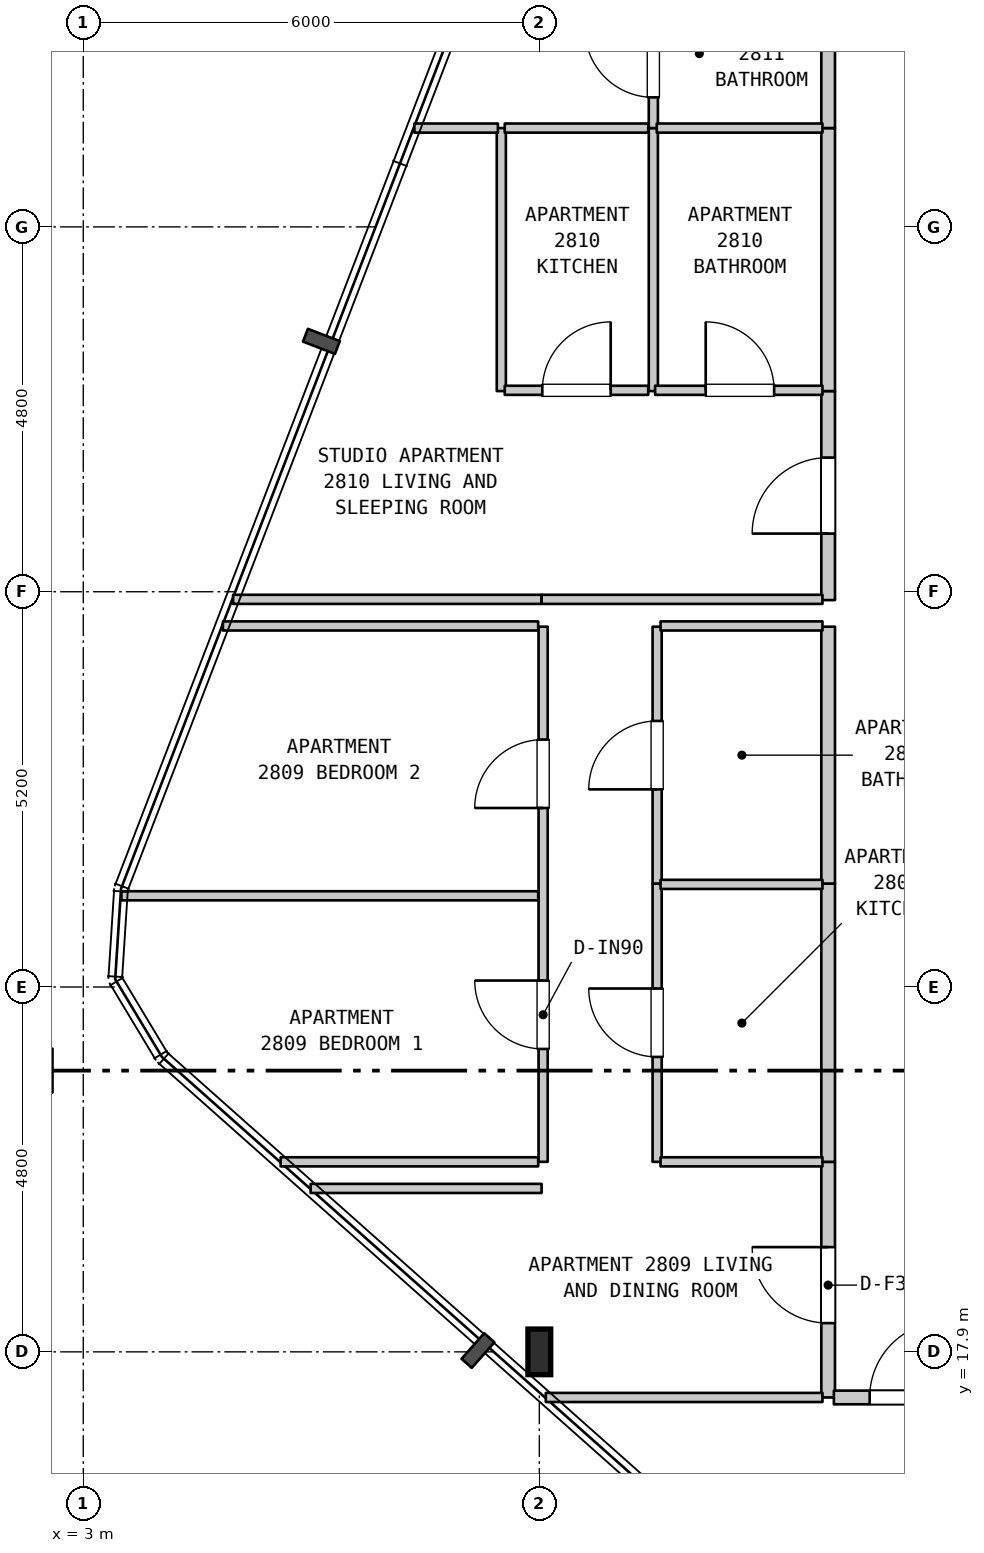
"""IFC4 building model, lengths in metres.
Left out: names, types, materials, properties, quantities, classifications, styles, units other than length and angle.
Written with IfcOpenShell. Run it as: python <this file> out.ifc"""

import sys

from ifc_helpers import new_model, si_unit, direction, frame, frame_2d, origin, origin_2d, place, context, subcontext, project, spatial, rectangle, i_section, extrude, element, fill, save


model = new_model("IFC4")
c1 = context("Model", 3, precision=1e-05, world=origin(), true_north=direction((0.0, 1.0)))
c2 = subcontext(c1, "Body", "Model", "MODEL_VIEW")
j1 = project(units=[si_unit("LENGTHUNIT", "METRE"), si_unit("PLANEANGLEUNIT", "RADIAN")], contexts=[c1])
p1 = place(None, origin())
s1 = spatial("IfcSite", under=j1, at=p1, CompositionType="ELEMENT")
p2 = place(p1, origin())
s2 = spatial("IfcBuilding", under=s1, at=p2, CompositionType="ELEMENT")
p3 = place(p2, frame((0.0, 0.0, 116.8)))
s3 = spatial("IfcBuildingStorey", under=s2, at=p3, CompositionType="ELEMENT", Elevation=116.8)
p4 = place(p3, frame((9.0, 17.9, 0.0), z_axis=(0.0, 0.0, 1.0), x_axis=(1.0, 0.0, 0.0)))
e1 = element("IfcColumn", 1, at=p4, inside=s3, PredefinedType="COLUMN", context=c2, shape_type="SweptSolid", body=[
    extrude(i_section(OverallWidth=0.3, OverallDepth=0.6, WebThickness=0.015, FlangeThickness=0.03, FilletRadius=0.027, at=origin_2d()), origin(), (0.0, 0.0, 1.0), 3.7),
])
p5 = place(p3, frame((8.5, 30.54, 0.0), z_axis=(0.0, 0.0, 1.0), x_axis=(0.0, 1.0, 0.0)))
e2 = element("IfcWall", 2, at=p5, inside=s3, PredefinedType="PARTITIONING", context=c2, shape_type="SweptSolid", body=[
    extrude(rectangle(XDim=3.46, YDim=0.12, at=frame_2d((1.73, 0.0))), origin(), (0.0, 0.0, 1.0), 3.38),
])
p6 = place(p3, frame((9.05, 20.4, 0.0), z_axis=(0.0, 0.0, 1.0), x_axis=(0.0, 1.0, 0.0)))
e3 = element("IfcWall", 3, at=p6, inside=s3, PredefinedType="PARTITIONING", context=c2, shape_type="SweptSolid", body=[
    extrude(rectangle(XDim=7.04, YDim=0.12, at=frame_2d((3.52, 0.0))), origin(), (0.0, 0.0, 1.0), 2.78),
])
p7 = place(p6, frame((1.485, 0.0, 0.0)))
e4 = element("IfcOpeningElement", 4, at=p7, cuts=e3, PredefinedType="OPENING", context=c2, shape_type="SweptSolid", body=[
    extrude(rectangle(XDim=0.9, YDim=2.15, at=frame_2d((0.45, 1.075))), frame((0.0, 0.07, 0.0), z_axis=(0.0, -1.0, 0.0), x_axis=(1.0, 0.0, 0.0)), (0.0, 0.0, 1.0), 0.14),
])
p8 = place(p6, frame((4.655, 0.0, 0.0)))
e5 = element("IfcOpeningElement", 5, at=p8, cuts=e3, PredefinedType="OPENING", context=c2, shape_type="SweptSolid", body=[
    extrude(rectangle(XDim=0.9, YDim=2.15, at=frame_2d((0.45, 1.075))), frame((0.0, 0.07, 0.0), z_axis=(0.0, -1.0, 0.0), x_axis=(1.0, 0.0, 0.0)), (0.0, 0.0, 1.0), 0.14),
])
p9 = place(p3, frame((10.5, 30.54, 0.0), z_axis=(0.0, 0.0, 1.0), x_axis=(0.0, 1.0, 0.0)))
e6 = element("IfcWall", 6, at=p9, inside=s3, PredefinedType="PARTITIONING", context=c2, shape_type="SweptSolid", body=[
    extrude(rectangle(XDim=3.46, YDim=0.12, at=frame_2d((1.73, 0.0))), origin(), (0.0, 0.0, 1.0), 3.38),
])
p10 = place(p3, frame((10.5, 34.0, 0.0), z_axis=(0.0, 0.0, 1.0), x_axis=(0.0, 1.0, 0.0)))
e7 = element("IfcWall", 7, at=p10, inside=s3, PredefinedType="PARTITIONING", context=c2, shape_type="SweptSolid", body=[
    extrude(rectangle(XDim=1.708, YDim=0.12, at=frame_2d((0.854, 0.0))), origin(), (0.0, 0.0, 1.0), 3.38),
])
p11 = place(p10, frame((0.404, 0.0, 0.0)))
e8 = element("IfcOpeningElement", 8, at=p11, cuts=e7, PredefinedType="OPENING", context=c2, shape_type="SweptSolid", body=[
    extrude(rectangle(XDim=0.9, YDim=2.15, at=frame_2d((0.45, 1.075))), frame((0.0, 0.07, 0.0), z_axis=(0.0, -1.0, 0.0), x_axis=(1.0, 0.0, 0.0)), (0.0, 0.0, 1.0), 0.14),
])
p12 = place(p3, frame((10.55, 20.4, 0.0), z_axis=(0.0, 0.0, 1.0), x_axis=(0.0, 1.0, 0.0)))
e9 = element("IfcWall", 9, at=p12, inside=s3, PredefinedType="PARTITIONING", context=c2, shape_type="SweptSolid", body=[
    extrude(rectangle(XDim=3.661, YDim=0.12, at=frame_2d((1.831, 0.0))), origin(), (0.0, 0.0, 1.0), 3.38),
])
p13 = place(p12, frame((1.38, 0.0, 0.0)))
e10 = element("IfcOpeningElement", 10, at=p13, cuts=e9, PredefinedType="OPENING", context=c2, shape_type="SweptSolid", body=[
    extrude(rectangle(XDim=0.9, YDim=2.15, at=frame_2d((0.45, 1.075))), frame((0.0, 0.07, 0.0), z_axis=(0.0, -1.0, 0.0), x_axis=(1.0, 0.0, 0.0)), (0.0, 0.0, 1.0), 0.14),
])
p14 = place(p3, frame((10.55, 24.061, 0.0), z_axis=(0.0, 0.0, 1.0), x_axis=(0.0, 1.0, 0.0)))
e11 = element("IfcWall", 11, at=p14, inside=s3, PredefinedType="PARTITIONING", context=c2, shape_type="SweptSolid", body=[
    extrude(rectangle(XDim=3.379, YDim=0.12, at=frame_2d((1.689, 0.0))), origin(), (0.0, 0.0, 1.0), 3.38),
])
p15 = place(p14, frame((1.239, 0.0, 0.0)))
e12 = element("IfcOpeningElement", 12, at=p15, cuts=e11, PredefinedType="OPENING", context=c2, shape_type="SweptSolid", body=[
    extrude(rectangle(XDim=0.9, YDim=2.1, at=frame_2d((0.45, 1.05))), frame((0.0, 0.07, 0.0), z_axis=(0.0, -1.0, 0.0), x_axis=(1.0, 0.0, 0.0)), (0.0, 0.0, 1.0), 0.14),
])
p16 = place(p3, frame((12.8, 17.3, 0.0), z_axis=(0.0, 0.0, 1.0), x_axis=(0.0, 1.0, 0.0)))
e13 = element("IfcWall", 13, at=p16, inside=s3, PredefinedType="STANDARD", context=c2, shape_type="SweptSolid", body=[
    extrude(rectangle(XDim=3.1, YDim=0.18, at=frame_2d((1.55, 0.0))), origin(), (0.0, 0.0, 1.0), 3.38),
])
p17 = place(p16, frame((0.978, 0.0, 0.0)))
e14 = element("IfcOpeningElement", 14, at=p17, cuts=e13, PredefinedType="OPENING", context=c2, shape_type="SweptSolid", body=[
    extrude(rectangle(XDim=1.0, YDim=2.15, at=frame_2d((0.5, 1.075))), frame((0.0, 0.1, 0.0), z_axis=(0.0, -1.0, 0.0), x_axis=(1.0, 0.0, 0.0)), (0.0, 0.0, 1.0), 0.2),
])
p18 = place(p3, frame((12.8, 20.4, 0.0), z_axis=(0.0, 0.0, 1.0), x_axis=(0.0, 1.0, 0.0)))
e15 = element("IfcWall", 15, at=p18, inside=s3, PredefinedType="STANDARD", context=c2, shape_type="SweptSolid", body=[
    extrude(rectangle(XDim=3.661, YDim=0.18, at=frame_2d((1.831, 0.0))), origin(), (0.0, 0.0, 1.0), 3.38),
])
p19 = place(p3, frame((12.8, 24.061, 0.0), z_axis=(0.0, 0.0, 1.0), x_axis=(0.0, 1.0, 0.0)))
e16 = element("IfcWall", 16, at=p19, inside=s3, PredefinedType="STANDARD", context=c2, shape_type="SweptSolid", body=[
    extrude(rectangle(XDim=3.379, YDim=0.18, at=frame_2d((1.689, 0.0))), origin(), (0.0, 0.0, 1.0), 3.38),
])
p20 = place(p3, frame((12.8, 27.79, 0.0), z_axis=(0.0, 0.0, 1.0), x_axis=(0.0, 1.0, 0.0)))
e17 = element("IfcWall", 17, at=p20, inside=s3, PredefinedType="STANDARD", context=c2, shape_type="SweptSolid", body=[
    extrude(rectangle(XDim=2.75, YDim=0.18, at=frame_2d((1.375, 0.0))), origin(), (0.0, 0.0, 1.0), 3.38),
])
p21 = place(p20, frame((0.875, 0.0, 0.0)))
e18 = element("IfcOpeningElement", 18, at=p21, cuts=e17, PredefinedType="OPENING", context=c2, shape_type="SweptSolid", body=[
    extrude(rectangle(XDim=1.0, YDim=2.15, at=frame_2d((0.5, 1.075))), frame((0.0, 0.1, 0.0), z_axis=(0.0, -1.0, 0.0), x_axis=(1.0, 0.0, 0.0)), (0.0, 0.0, 1.0), 0.2),
])
p22 = place(p3, frame((12.8, 30.54, 0.0), z_axis=(0.0, 0.0, 1.0), x_axis=(0.0, 1.0, 0.0)))
e19 = element("IfcWall", 19, at=p22, inside=s3, PredefinedType="STANDARD", context=c2, shape_type="SweptSolid", body=[
    extrude(rectangle(XDim=3.46, YDim=0.18, at=frame_2d((1.73, 0.0))), origin(), (0.0, 0.0, 1.0), 3.38),
])
p23 = place(p3, frame((12.8, 34.0, 0.0), z_axis=(0.0, 0.0, 1.0), x_axis=(0.0, 1.0, 0.0)))
e20 = element("IfcWall", 20, at=p23, inside=s3, PredefinedType="STANDARD", context=c2, shape_type="SweptSolid", body=[
    extrude(rectangle(XDim=1.708, YDim=0.18, at=frame_2d((0.854, 0.0))), origin(), (0.0, 0.0, 1.0), 3.38),
])
p24 = place(p3, frame((9.085, 17.3, 0.0), z_axis=(0.0, 0.0, 1.0), x_axis=(1.0, 0.0, 0.0)))
e21 = element("IfcWall", 21, at=p24, inside=s3, PredefinedType="PARTITIONING", context=c2, shape_type="SweptSolid", body=[
    extrude(rectangle(XDim=3.64, YDim=0.12, at=frame_2d((1.82, 0.0))), origin(), (0.0, 0.0, 1.0), 3.38),
])
p25 = place(p3, frame((12.875, 17.3, 0.0), z_axis=(0.0, 0.0, 1.0), x_axis=(1.0, 0.0, 0.0)))
e22 = element("IfcWall", 22, at=p25, inside=s3, PredefinedType="STANDARD", context=c2, shape_type="SweptSolid", body=[
    extrude(rectangle(XDim=3.28, YDim=0.18, at=frame_2d((1.64, 0.0))), origin(), (0.0, 0.0, 1.0), 3.38),
])
p26 = place(p25, frame((0.471, 0.0, 0.0)))
e23 = element("IfcOpeningElement", 23, at=p26, cuts=e22, PredefinedType="OPENING", context=c2, shape_type="SweptSolid", body=[
    extrude(rectangle(XDim=1.0, YDim=2.15, at=frame_2d((0.5, 1.075))), frame((0.0, 0.1, 0.0), z_axis=(0.0, -1.0, 0.0), x_axis=(1.0, 0.0, 0.0)), (0.0, 0.0, 1.0), 0.2),
])
p27 = place(p3, frame((5.991, 20.05, 0.0), z_axis=(0.0, 0.0, 1.0), x_axis=(1.0, 0.0, 0.0)))
e24 = element("IfcWall", 24, at=p27, inside=s3, PredefinedType="PARTITIONING", context=c2, shape_type="SweptSolid", body=[
    extrude(rectangle(XDim=3.039, YDim=0.12, at=frame_2d((1.52, 0.0))), origin(), (0.0, 0.0, 1.0), 3.38),
])
p28 = place(p3, frame((5.597, 20.4, 0.0), z_axis=(0.0, 0.0, 1.0), x_axis=(1.0, 0.0, 0.0)))
e25 = element("IfcWall", 25, at=p28, inside=s3, PredefinedType="PARTITIONING", context=c2, shape_type="SweptSolid", body=[
    extrude(rectangle(XDim=3.388, YDim=0.12, at=frame_2d((1.694, 0.0))), origin(), (0.0, 0.0, 1.0), 3.38),
])
p29 = place(p3, frame((10.595, 20.4, 0.0), z_axis=(0.0, 0.0, 1.0), x_axis=(1.0, 0.0, 0.0)))
e26 = element("IfcWall", 26, at=p29, inside=s3, PredefinedType="PARTITIONING", context=c2, shape_type="SweptSolid", body=[
    extrude(rectangle(XDim=2.13, YDim=0.12, at=frame_2d((1.065, 0.0))), origin(), (0.0, 0.0, 1.0), 3.38),
])
p30 = place(p3, frame((3.501, 23.9, 0.0), z_axis=(0.0, 0.0, 1.0), x_axis=(1.0, 0.0, 0.0)))
e27 = element("IfcWall", 27, at=p30, inside=s3, PredefinedType="PARTITIONING", context=c2, shape_type="SweptSolid", body=[
    extrude(rectangle(XDim=5.484, YDim=0.12, at=frame_2d((2.742, 0.0))), origin(), (0.0, 0.0, 1.0), 3.38),
])
p31 = place(p3, frame((10.595, 24.05, 0.0), z_axis=(0.0, 0.0, 1.0), x_axis=(1.0, 0.0, 0.0)))
e28 = element("IfcWall", 28, at=p31, inside=s3, PredefinedType="PARTITIONING", context=c2, shape_type="SweptSolid", body=[
    extrude(rectangle(XDim=2.13, YDim=0.12, at=frame_2d((1.065, 0.0))), origin(), (0.0, 0.0, 1.0), 3.38),
])
p32 = place(p3, frame((4.837, 27.45, 0.0), z_axis=(0.0, 0.0, 1.0), x_axis=(1.0, 0.0, 0.0)))
e29 = element("IfcWall", 29, at=p32, inside=s3, PredefinedType="PARTITIONING", context=c2, shape_type="SweptSolid", body=[
    extrude(rectangle(XDim=4.148, YDim=0.12, at=frame_2d((2.074, 0.0))), origin(), (0.0, 0.0, 1.0), 3.38),
])
p33 = place(p3, frame((10.595, 27.45, 0.0), z_axis=(0.0, 0.0, 1.0), x_axis=(1.0, 0.0, 0.0)))
e30 = element("IfcWall", 30, at=p33, inside=s3, PredefinedType="PARTITIONING", context=c2, shape_type="SweptSolid", body=[
    extrude(rectangle(XDim=2.13, YDim=0.12, at=frame_2d((1.065, 0.0))), origin(), (0.0, 0.0, 1.0), 3.38),
])
p34 = place(p3, frame((4.971, 27.8, 0.0), z_axis=(0.0, 0.0, 1.0), x_axis=(1.0, 0.0, 0.0)))
e31 = element("IfcWall", 31, at=p34, inside=s3, PredefinedType="PARTITIONING", context=c2, shape_type="SweptSolid", body=[
    extrude(rectangle(XDim=4.059, YDim=0.12, at=frame_2d((2.03, 0.0))), origin(), (0.0, 0.0, 1.0), 3.38),
])
p35 = place(p3, frame((9.03, 27.8, 0.0), z_axis=(0.0, 0.0, 1.0), x_axis=(1.0, 0.0, 0.0)))
e32 = element("IfcWall", 32, at=p35, inside=s3, PredefinedType="PARTITIONING", context=c2, shape_type="SweptSolid", body=[
    extrude(rectangle(XDim=3.695, YDim=0.12, at=frame_2d((1.848, 0.0))), origin(), (0.0, 0.0, 1.0), 3.38),
])
p36 = place(p3, frame((8.545, 30.55, 0.0), z_axis=(0.0, 0.0, 1.0), x_axis=(1.0, 0.0, 0.0)))
e33 = element("IfcWall", 33, at=p36, inside=s3, PredefinedType="PARTITIONING", context=c2, shape_type="SweptSolid", body=[
    extrude(rectangle(XDim=1.888, YDim=0.12, at=frame_2d((0.944, 0.0))), origin(), (0.0, 0.0, 1.0), 3.38),
])
p37 = place(p36, frame((0.494, 0.0, 0.0)))
e34 = element("IfcOpeningElement", 34, at=p37, cuts=e33, PredefinedType="OPENING", context=c2, shape_type="SweptSolid", body=[
    extrude(rectangle(XDim=0.9, YDim=2.15, at=frame_2d((0.45, 1.075))), frame((0.0, 0.07, 0.0), z_axis=(0.0, -1.0, 0.0), x_axis=(1.0, 0.0, 0.0)), (0.0, 0.0, 1.0), 0.14),
])
p38 = place(p3, frame((10.523, 30.55, 0.0), z_axis=(0.0, 0.0, 1.0), x_axis=(1.0, 0.0, 0.0)))
e35 = element("IfcWall", 35, at=p38, inside=s3, PredefinedType="PARTITIONING", context=c2, shape_type="SweptSolid", body=[
    extrude(rectangle(XDim=2.202, YDim=0.12, at=frame_2d((1.101, 0.0))), origin(), (0.0, 0.0, 1.0), 3.38),
])
p39 = place(p38, frame((0.666, 0.0, 0.0)))
e36 = element("IfcOpeningElement", 36, at=p39, cuts=e35, PredefinedType="OPENING", context=c2, shape_type="SweptSolid", body=[
    extrude(rectangle(XDim=0.9, YDim=2.1, at=frame_2d((0.45, 1.05))), frame((0.0, 0.07, 0.0), z_axis=(0.0, -1.0, 0.0), x_axis=(1.0, 0.0, 0.0)), (0.0, 0.0, 1.0), 0.14),
])
p40 = place(p3, frame((7.356, 34.0, 0.0), z_axis=(0.0, 0.0, 1.0), x_axis=(1.0, 0.0, 0.0)))
e37 = element("IfcWall", 37, at=p40, inside=s3, PredefinedType="PARTITIONING", context=c2, shape_type="SweptSolid", body=[
    extrude(rectangle(XDim=1.099, YDim=0.12, at=frame_2d((0.55, 0.0))), origin(), (0.0, 0.0, 1.0), 3.38),
])
p41 = place(p3, frame((8.545, 34.0, 0.0), z_axis=(0.0, 0.0, 1.0), x_axis=(1.0, 0.0, 0.0)))
e38 = element("IfcWall", 38, at=p41, inside=s3, PredefinedType="PARTITIONING", context=c2, shape_type="SweptSolid", body=[
    extrude(rectangle(XDim=1.888, YDim=0.12, at=frame_2d((0.944, 0.0))), origin(), (0.0, 0.0, 1.0), 3.38),
])
p42 = place(p3, frame((10.545, 34.0, 0.0), z_axis=(0.0, 0.0, 1.0), x_axis=(1.0, 0.0, 0.0)))
e39 = element("IfcWall", 39, at=p42, inside=s3, PredefinedType="PARTITIONING", context=c2, shape_type="SweptSolid", body=[
    extrude(rectangle(XDim=2.18, YDim=0.12, at=frame_2d((1.09, 0.0))), origin(), (0.0, 0.0, 1.0), 3.38),
])
p43 = place(p7, origin())
e40 = element("IfcDoor", 40, at=p43, inside=s3, OperationType="SINGLE_SWING_RIGHT", PredefinedType="DOOR", context=c2, shape_type="SweptSolid", body=[
    extrude(rectangle(XDim=0.9, YDim=2.15, at=frame_2d((0.45, 1.075))), frame((0.0, 0.025, 0.0), z_axis=(0.0, -1.0, 0.0), x_axis=(1.0, 0.0, 0.0)), (0.0, 0.0, 1.0), 0.05),
])
fill(e4, e40)
p44 = place(p8, origin())
e41 = element("IfcDoor", 41, at=p44, inside=s3, OperationType="SINGLE_SWING_LEFT", PredefinedType="DOOR", context=c2, shape_type="SweptSolid", body=[
    extrude(rectangle(XDim=0.9, YDim=2.15, at=frame_2d((0.45, 1.075))), frame((0.0, 0.025, 0.0), z_axis=(0.0, -1.0, 0.0), x_axis=(1.0, 0.0, 0.0)), (0.0, 0.0, 1.0), 0.05),
])
fill(e5, e41)
p45 = place(p11, origin())
e42 = element("IfcDoor", 42, at=p45, inside=s3, OperationType="SINGLE_SWING_RIGHT", PredefinedType="DOOR", context=c2, shape_type="SweptSolid", body=[
    extrude(rectangle(XDim=0.9, YDim=2.15, at=frame_2d((0.45, 1.075))), frame((0.0, 0.025, 0.0), z_axis=(0.0, -1.0, 0.0), x_axis=(1.0, 0.0, 0.0)), (0.0, 0.0, 1.0), 0.05),
])
fill(e8, e42)
p46 = place(p13, origin())
e43 = element("IfcDoor", 43, at=p46, inside=s3, OperationType="SINGLE_SWING_RIGHT", PredefinedType="DOOR", context=c2, shape_type="SweptSolid", body=[
    extrude(rectangle(XDim=0.9, YDim=2.15, at=frame_2d((0.45, 1.075))), frame((0.0, 0.025, 0.0), z_axis=(0.0, -1.0, 0.0), x_axis=(1.0, 0.0, 0.0)), (0.0, 0.0, 1.0), 0.05),
])
fill(e10, e43)
p47 = place(p15, origin())
e44 = element("IfcDoor", 44, at=p47, inside=s3, OperationType="SINGLE_SWING_LEFT", PredefinedType="DOOR", context=c2, shape_type="SweptSolid", body=[
    extrude(rectangle(XDim=0.9, YDim=2.1, at=frame_2d((0.45, 1.05))), frame((0.0, 0.025, 0.0), z_axis=(0.0, -1.0, 0.0), x_axis=(1.0, 0.0, 0.0)), (0.0, 0.0, 1.0), 0.05),
])
fill(e12, e44)
p48 = place(p17, origin())
e45 = element("IfcDoor", 45, at=p48, inside=s3, OperationType="SINGLE_SWING_RIGHT", PredefinedType="DOOR", context=c2, shape_type="SweptSolid", body=[
    extrude(rectangle(XDim=1.0, YDim=2.15, at=frame_2d((0.5, 1.075))), frame((0.0, 0.025, 0.0), z_axis=(0.0, -1.0, 0.0), x_axis=(1.0, 0.0, 0.0)), (0.0, 0.0, 1.0), 0.05),
])
fill(e14, e45)
p49 = place(p21, origin())
e46 = element("IfcDoor", 46, at=p49, inside=s3, OperationType="SINGLE_SWING_LEFT", PredefinedType="DOOR", context=c2, shape_type="SweptSolid", body=[
    extrude(rectangle(XDim=1.0, YDim=2.15, at=frame_2d((0.5, 1.075))), frame((0.0, 0.025, 0.0), z_axis=(0.0, -1.0, 0.0), x_axis=(1.0, 0.0, 0.0)), (0.0, 0.0, 1.0), 0.05),
])
fill(e18, e46)
p50 = place(p26, origin())
e47 = element("IfcDoor", 47, at=p50, inside=s3, OperationType="SINGLE_SWING_RIGHT", PredefinedType="DOOR", context=c2, shape_type="SweptSolid", body=[
    extrude(rectangle(XDim=1.0, YDim=2.15, at=frame_2d((0.5, 1.075))), frame((0.0, 0.025, 0.0), z_axis=(0.0, -1.0, 0.0), x_axis=(1.0, 0.0, 0.0)), (0.0, 0.0, 1.0), 0.05),
])
fill(e23, e47)
p51 = place(p37, origin())
e48 = element("IfcDoor", 48, at=p51, inside=s3, OperationType="SINGLE_SWING_RIGHT", PredefinedType="DOOR", context=c2, shape_type="SweptSolid", body=[
    extrude(rectangle(XDim=0.9, YDim=2.15, at=frame_2d((0.45, 1.075))), frame((0.0, 0.025, 0.0), z_axis=(0.0, -1.0, 0.0), x_axis=(1.0, 0.0, 0.0)), (0.0, 0.0, 1.0), 0.05),
])
fill(e34, e48)
p52 = place(p39, origin())
e49 = element("IfcDoor", 49, at=p52, inside=s3, OperationType="SINGLE_SWING_LEFT", PredefinedType="DOOR", context=c2, shape_type="SweptSolid", body=[
    extrude(rectangle(XDim=0.9, YDim=2.1, at=frame_2d((0.45, 1.05))), frame((0.0, 0.025, 0.0), z_axis=(0.0, -1.0, 0.0), x_axis=(1.0, 0.0, 0.0)), (0.0, 0.0, 1.0), 0.05),
])
fill(e36, e49)
save(model, sys.argv[1])
